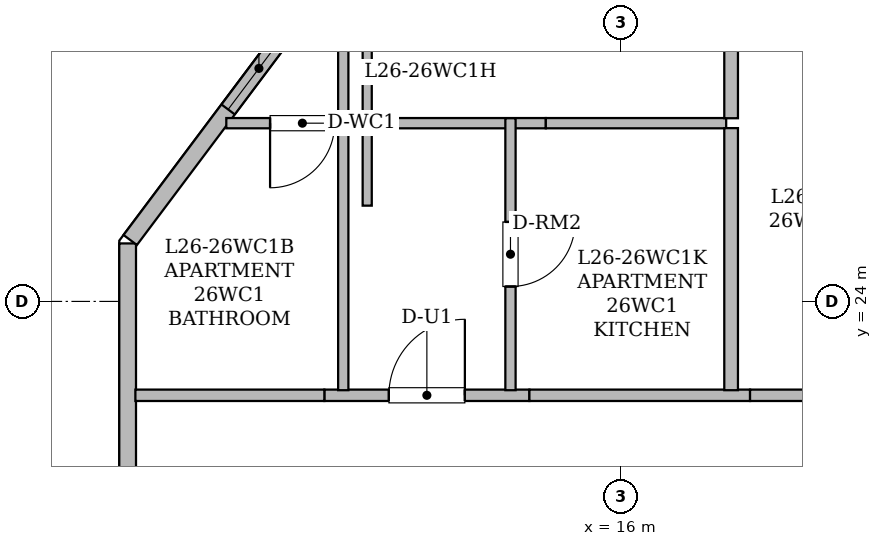
"""IFC4 building model, lengths in metres.
Left out: names, types, materials, properties, quantities, classifications, styles, units other than length and angle.
Written with IfcOpenShell. Run it as: python <this file> out.ifc"""

import sys

from ifc_helpers import new_model, si_unit, direction, frame, frame_2d, origin, place, context, subcontext, project, spatial, rectangle, extrude, element, fill, save


model = new_model("IFC4")
c1 = context("Model", 3, precision=1e-05, world=origin(), true_north=direction((0.0, 1.0)))
c2 = subcontext(c1, "Body", "Model", "MODEL_VIEW")
j1 = project(units=[si_unit("LENGTHUNIT", "METRE"), si_unit("PLANEANGLEUNIT", "RADIAN")], contexts=[c1])
p1 = place(None, origin())
s1 = spatial("IfcSite", under=j1, at=p1, CompositionType="ELEMENT")
p2 = place(p1, origin())
s2 = spatial("IfcBuilding", under=s1, at=p2, CompositionType="ELEMENT")
p3 = place(p2, frame((0.0, 0.0, 105.55)))
s3 = spatial("IfcBuildingStorey", under=s2, at=p3, CompositionType="ELEMENT", Elevation=105.55)
p4 = place(p3, frame((9.51, 10.717, 0.0), z_axis=(0.0, 0.0, 1.0), x_axis=(0.0, 1.0, 0.0)))
e1 = element("IfcWall", 1, at=p4, inside=s3, PredefinedType="STANDARD", context=c2, shape_type="SweptSolid", body=[
    extrude(rectangle(XDim=14.046, YDim=0.22, at=frame_2d((7.023, 0.0))), origin(), (0.0, 0.0, 1.0), 3.43),
])
p5 = place(p4, frame((5.744, 0.0, 0.8)))
e2 = element("IfcOpeningElement", 2, at=p5, cuts=e1, PredefinedType="OPENING", context=c2, shape_type="SweptSolid", body=[
    extrude(rectangle(XDim=1.2, YDim=1.5, at=frame_2d((0.6, 0.75))), frame((0.0, 0.12, 0.0), z_axis=(0.0, -1.0, 0.0), x_axis=(1.0, 0.0, 0.0)), (0.0, 0.0, 1.0), 0.24),
])
p6 = place(p4, frame((2.345, 0.0, 0.85)))
e3 = element("IfcOpeningElement", 3, at=p6, cuts=e1, PredefinedType="OPENING", context=c2, shape_type="SweptSolid", body=[
    extrude(rectangle(XDim=1.65, YDim=1.55, at=frame_2d((0.825, 0.775))), frame((0.0, 0.12, 0.0), z_axis=(0.0, -1.0, 0.0), x_axis=(1.0, 0.0, 0.0)), (0.0, 0.0, 1.0), 0.24),
])
p7 = place(p3, frame((9.544, 24.808, 0.0), z_axis=(0.0, 0.0, 1.0), x_axis=(0.600019580308, 0.799985314394, 0.0)))
e4 = element("IfcWall", 4, at=p7, inside=s3, PredefinedType="STANDARD", context=c2, shape_type="SweptSolid", body=[
    extrude(rectangle(XDim=3.99, YDim=0.22, at=frame_2d((1.995, 0.0))), origin(), (0.0, 0.0, 1.0), 3.43),
])
p8 = place(p7, frame((2.147, 0.0, 0.85)))
e5 = element("IfcOpeningElement", 5, at=p8, cuts=e4, PredefinedType="OPENING", context=c2, shape_type="SweptSolid", body=[
    extrude(rectangle(XDim=1.35, YDim=1.5, at=frame_2d((0.675, 0.75))), frame((0.0, 0.12, 0.0), z_axis=(0.0, -1.0, 0.0), x_axis=(1.0, 0.0, 0.0)), (0.0, 0.0, 1.0), 0.24),
])
p9 = place(p3, frame((12.098, 22.765, 0.0), z_axis=(0.0, 0.0, 1.0), x_axis=(1.0, 0.0, 0.0)))
e6 = element("IfcWall", 6, at=p9, inside=s3, PredefinedType="STANDARD", context=c2, shape_type="SweptSolid", body=[
    extrude(rectangle(XDim=2.698, YDim=0.15, at=frame_2d((1.349, 0.0))), origin(), (0.0, 0.0, 1.0), 2.876),
])
p10 = place(p9, frame((0.849, 0.0, 0.0)))
e7 = element("IfcOpeningElement", 7, at=p10, cuts=e6, PredefinedType="OPENING", context=c2, shape_type="SweptSolid", body=[
    extrude(rectangle(XDim=1.0, YDim=2.15, at=frame_2d((0.5, 1.075))), frame((0.0, 0.085, 0.0), z_axis=(0.0, -1.0, 0.0), x_axis=(1.0, 0.0, 0.0)), (0.0, 0.0, 1.0), 0.17),
])
p11 = place(p3, frame((9.612, 22.765, 0.0), z_axis=(0.0, 0.0, 1.0), x_axis=(1.0, 0.0, 0.0)))
e8 = element("IfcWall", 8, at=p11, inside=s3, PredefinedType="STANDARD", context=c2, shape_type="SweptSolid", body=[
    extrude(rectangle(XDim=2.486, YDim=0.15, at=frame_2d((1.243, 0.0))), origin(), (0.0, 0.0, 1.0), 2.876),
])
p12 = place(p3, frame((14.796, 22.765, 0.0), z_axis=(0.0, 0.0, 1.0), x_axis=(1.0, 0.0, 0.0)))
e9 = element("IfcWall", 9, at=p12, inside=s3, PredefinedType="STANDARD", context=c2, shape_type="SweptSolid", body=[
    extrude(rectangle(XDim=2.903, YDim=0.15, at=frame_2d((1.452, 0.0))), origin(), (0.0, 0.0, 1.0), 3.43),
])
p13 = place(p3, frame((17.699, 22.765, 0.0), z_axis=(0.0, 0.0, 1.0), x_axis=(1.0, 0.0, 0.0)))
e10 = element("IfcWall", 10, at=p13, inside=s3, PredefinedType="STANDARD", context=c2, shape_type="SweptSolid", body=[
    extrude(rectangle(XDim=4.321, YDim=0.15, at=frame_2d((2.161, 0.0))), origin(), (0.0, 0.0, 1.0), 2.647),
])
p14 = place(p3, frame((12.347, 22.832, 0.0), z_axis=(0.0, 0.0, 1.0), x_axis=(0.0, 1.0, 0.0)))
e11 = element("IfcWall", 11, at=p14, inside=s3, PredefinedType="PARTITIONING", context=c2, shape_type="SweptSolid", body=[
    extrude(rectangle(XDim=6.178, YDim=0.135, at=frame_2d((3.089, 0.0))), origin(), (0.0, 0.0, 1.0), 2.876),
])
p15 = place(p3, frame((15.012, 26.345, 0.0), z_axis=(0.0, 0.0, 1.0), x_axis=(-1.0, 0.0, 0.0)))
e12 = element("IfcWall", 12, at=p15, inside=s3, PredefinedType="PARTITIONING", context=c2, shape_type="SweptSolid", body=[
    extrude(rectangle(XDim=4.204, YDim=0.135, at=frame_2d((2.102, 0.0))), origin(), (0.0, 0.0, 1.0), 2.876),
])
p16 = place(p15, frame((2.778, 0.0, 0.0)))
e13 = element("IfcOpeningElement", 13, at=p16, cuts=e12, PredefinedType="OPENING", context=c2, shape_type="SweptSolid", body=[
    extrude(rectangle(XDim=0.85, YDim=2.1, at=frame_2d((0.425, 1.05))), frame((0.0, 0.077, 0.0), z_axis=(0.0, -1.0, 0.0), x_axis=(1.0, 0.0, 0.0)), (0.0, 0.0, 1.0), 0.155),
])
p17 = place(p3, frame((17.385, 26.345, 0.0), z_axis=(0.0, 0.0, 1.0), x_axis=(-1.0, 0.0, 0.0)))
e14 = element("IfcWall", 14, at=p17, inside=s3, PredefinedType="PARTITIONING", context=c2, shape_type="SweptSolid", body=[
    extrude(rectangle(XDim=2.373, YDim=0.135, at=frame_2d((1.187, 0.0))), origin(), (0.0, 0.0, 1.0), 3.43),
])
p18 = place(p3, frame((14.547, 26.41, 0.0), z_axis=(0.0, 0.0, 1.0), x_axis=(0.0, -1.0, 0.0)))
e15 = element("IfcWall", 15, at=p18, inside=s3, PredefinedType="PARTITIONING", context=c2, shape_type="SweptSolid", body=[
    extrude(rectangle(XDim=3.578, YDim=0.135, at=frame_2d((1.789, 0.0))), origin(), (0.0, 0.0, 1.0), 3.43),
])
p19 = place(p18, frame((1.364, 0.0, 0.0)))
e16 = element("IfcOpeningElement", 16, at=p19, cuts=e15, PredefinedType="OPENING", context=c2, shape_type="SweptSolid", body=[
    extrude(rectangle(XDim=0.85, YDim=2.1, at=frame_2d((0.425, 1.05))), frame((0.0, 0.077, 0.0), z_axis=(0.0, -1.0, 0.0), x_axis=(1.0, 0.0, 0.0)), (0.0, 0.0, 1.0), 0.155),
])
p20 = place(p3, frame((12.662, 25.26, 0.0), z_axis=(0.0, 0.0, 1.0), x_axis=(0.0, 1.0, 0.0)))
e17 = element("IfcWall", 17, at=p20, inside=s3, PredefinedType="PARTITIONING", context=c2, shape_type="SweptSolid", body=[
    extrude(rectangle(XDim=10.162, YDim=0.12, at=frame_2d((5.081, 0.0))), origin(), (0.0, 0.0, 1.0), 3.43),
])
p21 = place(p20, frame((5.839, 0.0, 0.0)))
e18 = element("IfcOpeningElement", 18, at=p21, cuts=e17, PredefinedType="OPENING", context=c2, shape_type="SweptSolid", body=[
    extrude(rectangle(XDim=0.9, YDim=2.1, at=frame_2d((0.45, 1.05))), frame((0.0, 0.07, 0.0), z_axis=(0.0, -1.0, 0.0), x_axis=(1.0, 0.0, 0.0)), (0.0, 0.0, 1.0), 0.14),
])
p22 = place(p3, frame((17.45, 27.86, 0.0), z_axis=(0.0, 0.0, 1.0), x_axis=(0.0, -1.0, 0.0)))
e19 = element("IfcWall", 19, at=p22, inside=s3, PredefinedType="STANDARD", context=c2, shape_type="SweptSolid", body=[
    extrude(rectangle(XDim=1.45, YDim=0.18, at=frame_2d((0.725, 0.0))), origin(), (0.0, 0.0, 1.0), 3.43),
])
p23 = place(p3, frame((17.45, 26.28, 0.0), z_axis=(0.0, 0.0, 1.0), x_axis=(0.0, -1.0, 0.0)))
e20 = element("IfcWall", 20, at=p23, inside=s3, PredefinedType="STANDARD", context=c2, shape_type="SweptSolid", body=[
    extrude(rectangle(XDim=3.448, YDim=0.18, at=frame_2d((1.724, 0.0))), origin(), (0.0, 0.0, 1.0), 3.43),
])
p24 = place(p8, origin())
e21 = element("IfcWindow", 21, at=p24, inside=s3, PartitioningType="SINGLE_PANEL", PredefinedType="WINDOW", context=c2, shape_type="SweptSolid", body=[
    extrude(rectangle(XDim=1.35, YDim=1.5, at=frame_2d((0.675, 0.75))), frame((0.0, 0.03, 0.0), z_axis=(0.0, -1.0, 0.0), x_axis=(1.0, 0.0, 0.0)), (0.0, 0.0, 1.0), 0.06),
])
fill(e5, e21)
p25 = place(p10, origin())
e22 = element("IfcDoor", 22, at=p25, inside=s3, OperationType="SINGLE_SWING_RIGHT", PredefinedType="DOOR", context=c2, shape_type="SweptSolid", body=[
    extrude(rectangle(XDim=1.0, YDim=2.15, at=frame_2d((0.5, 1.075))), frame((0.0, 0.025, 0.0), z_axis=(0.0, -1.0, 0.0), x_axis=(1.0, 0.0, 0.0)), (0.0, 0.0, 1.0), 0.05),
])
fill(e7, e22)
p26 = place(p16, origin())
e23 = element("IfcDoor", 23, at=p26, inside=s3, OperationType="SINGLE_SWING_RIGHT", PredefinedType="DOOR", context=c2, shape_type="SweptSolid", body=[
    extrude(rectangle(XDim=0.85, YDim=2.1, at=frame_2d((0.425, 1.05))), frame((0.0, 0.025, 0.0), z_axis=(0.0, -1.0, 0.0), x_axis=(1.0, 0.0, 0.0)), (0.0, 0.0, 1.0), 0.05),
])
fill(e13, e23)
p27 = place(p19, origin())
e24 = element("IfcDoor", 24, at=p27, inside=s3, OperationType="SINGLE_SWING_LEFT", PredefinedType="DOOR", context=c2, shape_type="SweptSolid", body=[
    extrude(rectangle(XDim=0.85, YDim=2.1, at=frame_2d((0.425, 1.05))), frame((0.0, 0.025, 0.0), z_axis=(0.0, -1.0, 0.0), x_axis=(1.0, 0.0, 0.0)), (0.0, 0.0, 1.0), 0.05),
])
fill(e16, e24)
save(model, sys.argv[1])
